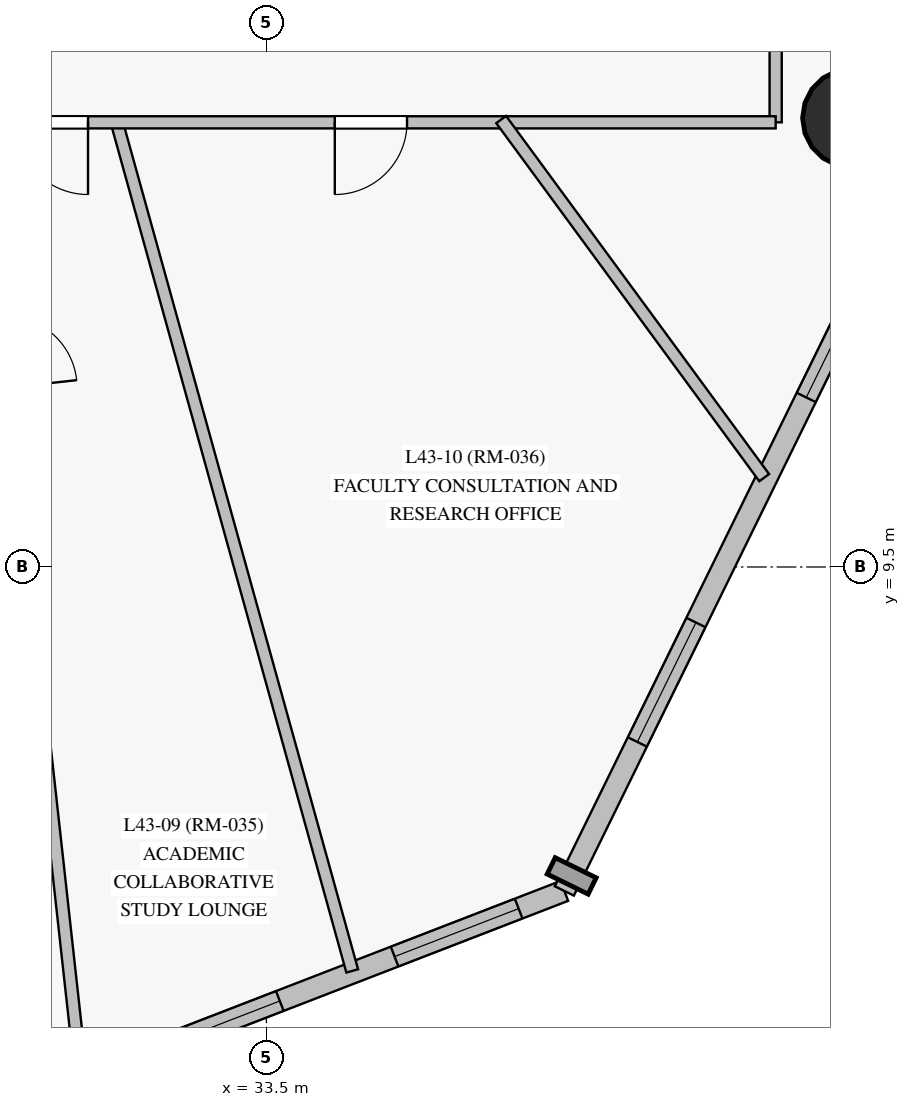
"""IFC4 building model, lengths in metres.
Left out: names, types, materials, properties, quantities, classifications, styles, units other than length and angle.
Written with IfcOpenShell. Run it as: python <this file> out.ifc"""

import sys

from ifc_helpers import new_model, si_unit, direction, frame, frame_2d, origin, origin_with_axes, origin_2d, place, context, subcontext, project, spatial, rectangle, circle, extrude, source, transform, mapped, element, fill, save


model = new_model("IFC4")
c1 = context("Model", 3, precision=1e-05, world=origin(), true_north=direction((0.0, 1.0)))
c2 = subcontext(c1, "Body", "Model", "MODEL_VIEW")
j1 = project(units=[si_unit("LENGTHUNIT", "METRE"), si_unit("PLANEANGLEUNIT", "RADIAN")], contexts=[c1])
p1 = place(None, origin())
s1 = spatial("IfcSite", under=j1, at=p1, CompositionType="ELEMENT")
p2 = place(p1, origin())
s2 = spatial("IfcBuilding", under=s1, at=p2, CompositionType="ELEMENT")
p3 = place(p2, frame((0.0, 0.0, 152.55)))
s3 = spatial("IfcBuildingStorey", under=s2, at=p3, CompositionType="ELEMENT", Elevation=152.55)
m1 = source(origin_with_axes(), c2, "Body", "SweptSolid", [
    extrude(circle(Radius=0.65, at=origin_2d()), origin(), (0.0, 0.0, 1.0), 4.0),
])
p4 = place(p3, frame((41.204, 15.406, 0.0), z_axis=(0.0, 0.0, 1.0), x_axis=(1.0, 0.0, 0.0)))
e1 = element("IfcColumn", 1, at=p4, inside=s3, PredefinedType="COLUMN", context=c2, shape_type="MappedRepresentation", body=[
    mapped(m1, transform((0.0, 0.0, 0.0), scale=1.0)),
])
p5 = place(p3, frame((28.661, 1.85, 0.0), z_axis=(0.0, 0.0, 1.0), x_axis=(0.93264769039, 0.360788422223, 0.0)))
e2 = element("IfcWall", 2, at=p5, inside=s3, PredefinedType="SOLIDWALL", context=c2, shape_type="SweptSolid", body=[
    extrude(rectangle(XDim=9.391, YDim=0.28, at=frame_2d((4.696, 0.0))), origin(), (0.0, 0.0, 1.0), 3.775),
])
p6 = place(p5, frame((0.552, 0.0, 0.85)))
e3 = element("IfcOpeningElement", 3, at=p6, cuts=e2, PredefinedType="OPENING", context=c2, shape_type="SweptSolid", body=[
    extrude(rectangle(XDim=1.55, YDim=1.65, at=frame_2d((0.775, 0.825))), frame((0.0, 0.15, 0.0), z_axis=(0.0, -1.0, 0.0), x_axis=(1.0, 0.0, 0.0)), (0.0, 0.0, 1.0), 0.3),
])
p7 = place(p5, frame((3.627, 0.0, 0.85)))
e4 = element("IfcOpeningElement", 4, at=p7, cuts=e2, PredefinedType="OPENING", context=c2, shape_type="SweptSolid", body=[
    extrude(rectangle(XDim=1.75, YDim=1.65, at=frame_2d((0.875, 0.825))), frame((0.0, 0.15, 0.0), z_axis=(0.0, -1.0, 0.0), x_axis=(1.0, 0.0, 0.0)), (0.0, 0.0, 1.0), 0.3),
])
p8 = place(p5, frame((6.997, 0.0, 0.85)))
e5 = element("IfcOpeningElement", 5, at=p8, cuts=e2, PredefinedType="OPENING", context=c2, shape_type="SweptSolid", body=[
    extrude(rectangle(XDim=1.75, YDim=1.65, at=frame_2d((0.875, 0.825))), frame((0.0, 0.15, 0.0), z_axis=(0.0, -1.0, 0.0), x_axis=(1.0, 0.0, 0.0)), (0.0, 0.0, 1.0), 0.3),
])
p9 = place(p3, frame((37.42, 5.238, 0.0), z_axis=(0.0, 0.0, 1.0), x_axis=(0.440185493808, 0.897906861005, 0.0)))
e6 = element("IfcWall", 6, at=p9, inside=s3, PredefinedType="SOLIDWALL", context=c2, shape_type="SweptSolid", body=[
    extrude(rectangle(XDim=13.922, YDim=0.28, at=frame_2d((6.961, 0.0))), origin(), (0.0, 0.0, 1.0), 3.775),
])
p10 = place(p9, frame((2.183, 0.0, 0.85)))
e7 = element("IfcOpeningElement", 7, at=p10, cuts=e6, PredefinedType="OPENING", context=c2, shape_type="SweptSolid", body=[
    extrude(rectangle(XDim=1.75, YDim=1.65, at=frame_2d((0.875, 0.825))), frame((0.0, 0.15, 0.0), z_axis=(0.0, -1.0, 0.0), x_axis=(1.0, 0.0, 0.0)), (0.0, 0.0, 1.0), 0.3),
])
p11 = place(p9, frame((7.23, 0.0, 0.85)))
e8 = element("IfcOpeningElement", 8, at=p11, cuts=e6, PredefinedType="OPENING", context=c2, shape_type="SweptSolid", body=[
    extrude(rectangle(XDim=1.75, YDim=1.65, at=frame_2d((0.875, 0.825))), frame((0.0, 0.15, 0.0), z_axis=(0.0, -1.0, 0.0), x_axis=(1.0, 0.0, 0.0)), (0.0, 0.0, 1.0), 0.3),
])
p12 = place(p9, frame((12.174, 0.0, 0.85)))
e9 = element("IfcOpeningElement", 9, at=p12, cuts=e6, PredefinedType="OPENING", context=c2, shape_type="SweptSolid", body=[
    extrude(rectangle(XDim=0.95, YDim=1.5, at=frame_2d((0.475, 0.75))), frame((0.0, 0.15, 0.0), z_axis=(0.0, -1.0, 0.0), x_axis=(1.0, 0.0, 0.0)), (0.0, 0.0, 1.0), 0.3),
])
p13 = place(p3, frame((40.2, 37.65, 0.0), z_axis=(0.0, 0.0, 1.0), x_axis=(0.0, -1.0, 0.0)))
e10 = element("IfcWall", 10, at=p13, inside=s3, PredefinedType="PARTITIONING", context=c2, shape_type="SweptSolid", body=[
    extrude(rectangle(XDim=22.3, YDim=0.16, at=frame_2d((11.15, 0.0))), origin(), (0.0, 0.0, 1.0), 3.325),
])
p14 = place(p13, frame((16.25, 0.0, 0.0)))
e11 = element("IfcOpeningElement", 11, at=p14, cuts=e10, PredefinedType="OPENING", context=c2, shape_type="SweptSolid", body=[
    extrude(rectangle(XDim=0.95, YDim=2.15, at=frame_2d((0.475, 1.075))), frame((0.0, 0.09, 0.0), z_axis=(0.0, -1.0, 0.0), x_axis=(1.0, 0.0, 0.0)), (0.0, 0.0, 1.0), 0.18),
])
p15 = place(p13, frame((11.115, 0.0, 0.0)))
e12 = element("IfcOpeningElement", 12, at=p15, cuts=e10, PredefinedType="OPENING", context=c2, shape_type="SweptSolid", body=[
    extrude(rectangle(XDim=0.95, YDim=2.15, at=frame_2d((0.475, 1.075))), frame((0.0, 0.09, 0.0), z_axis=(0.0, -1.0, 0.0), x_axis=(1.0, 0.0, 0.0)), (0.0, 0.0, 1.0), 0.18),
])
p16 = place(p13, frame((7.33, 0.0, 0.0)))
e13 = element("IfcOpeningElement", 13, at=p16, cuts=e10, PredefinedType="OPENING", context=c2, shape_type="SweptSolid", body=[
    extrude(rectangle(XDim=0.95, YDim=2.15, at=frame_2d((0.475, 1.075))), frame((0.0, 0.09, 0.0), z_axis=(0.0, -1.0, 0.0), x_axis=(1.0, 0.0, 0.0)), (0.0, 0.0, 1.0), 0.18),
])
p17 = place(p13, frame((5.01, 0.0, 0.0)))
e14 = element("IfcOpeningElement", 14, at=p17, cuts=e10, PredefinedType="OPENING", context=c2, shape_type="SweptSolid", body=[
    extrude(rectangle(XDim=0.95, YDim=2.15, at=frame_2d((0.475, 1.075))), frame((0.0, 0.09, 0.0), z_axis=(0.0, -1.0, 0.0), x_axis=(1.0, 0.0, 0.0)), (0.0, 0.0, 1.0), 0.18),
])
p18 = place(p3, frame((29.67, 15.38, 0.0), z_axis=(0.0, 0.0, 1.0), x_axis=(0.109978172038, -0.993934002676, 0.0)))
e15 = element("IfcWall", 15, at=p18, inside=s3, PredefinedType="PARTITIONING", context=c2, shape_type="SweptSolid", body=[
    extrude(rectangle(XDim=12.649, YDim=0.16, at=frame_2d((6.324, 0.0))), origin(), (0.0, 0.0, 1.0), 3.775),
])
p19 = place(p18, frame((2.598, 0.0, 0.0)))
e16 = element("IfcOpeningElement", 16, at=p19, cuts=e15, PredefinedType="OPENING", context=c2, shape_type="SweptSolid", body=[
    extrude(rectangle(XDim=0.95, YDim=2.15, at=frame_2d((0.475, 1.075))), frame((0.0, 0.09, 0.0), z_axis=(0.0, -1.0, 0.0), x_axis=(1.0, 0.0, 0.0)), (0.0, 0.0, 1.0), 0.18),
])
p20 = place(p3, frame((31.523, 15.379, 0.0), z_axis=(0.0, 0.0, 1.0), x_axis=(0.267345748254, -0.963600669827, 0.0)))
e17 = element("IfcWall", 17, at=p20, inside=s3, PredefinedType="PARTITIONING", context=c2, shape_type="SweptSolid", body=[
    extrude(rectangle(XDim=11.616, YDim=0.16, at=frame_2d((5.808, 0.0))), origin(), (0.0, 0.0, 1.0), 3.775),
])
p21 = place(p3, frame((40.2, 15.35, 0.0), z_axis=(0.0, 0.0, 1.0), x_axis=(-1.0, 0.0, 0.0)))
e18 = element("IfcWall", 18, at=p21, inside=s3, PredefinedType="PARTITIONING", context=c2, shape_type="SweptSolid", body=[
    extrude(rectangle(XDim=10.65, YDim=0.16, at=frame_2d((5.325, 0.0))), origin(), (0.0, 0.0, 1.0), 2.975),
])
p22 = place(p21, frame((9.047, 0.0, 0.0)))
e19 = element("IfcOpeningElement", 19, at=p22, cuts=e18, PredefinedType="OPENING", context=c2, shape_type="SweptSolid", body=[
    extrude(rectangle(XDim=0.95, YDim=2.15, at=frame_2d((0.475, 1.075))), frame((0.0, 0.09, 0.0), z_axis=(0.0, -1.0, 0.0), x_axis=(1.0, 0.0, 0.0)), (0.0, 0.0, 1.0), 0.18),
])
p23 = place(p21, frame((4.85, 0.0, 0.0)))
e20 = element("IfcOpeningElement", 20, at=p23, cuts=e18, PredefinedType="OPENING", context=c2, shape_type="SweptSolid", body=[
    extrude(rectangle(XDim=0.95, YDim=2.15, at=frame_2d((0.475, 1.075))), frame((0.0, 0.09, 0.0), z_axis=(0.0, -1.0, 0.0), x_axis=(1.0, 0.0, 0.0)), (0.0, 0.0, 1.0), 0.18),
])
p24 = place(p3, frame((36.589, 15.386, 0.0), z_axis=(0.0, 0.0, 1.0), x_axis=(0.59197733649, -0.805954609815, 0.0)))
e21 = element("IfcWall", 21, at=p24, inside=s3, PredefinedType="PARTITIONING", context=c2, shape_type="SweptSolid", body=[
    extrude(rectangle(XDim=5.845, YDim=0.16, at=frame_2d((2.923, 0.0))), origin(), (0.0, 0.0, 1.0), 3.775),
])
m2 = source(origin_with_axes(), c2, "Body", "SweptSolid", [
    extrude(rectangle(XDim=1.75, YDim=1.65, at=frame_2d((0.875, 0.825))), frame((0.0, 0.03, 0.0), z_axis=(0.0, -1.0, 0.0), x_axis=(1.0, 0.0, 0.0)), (0.0, 0.0, 1.0), 0.06),
])
p25 = place(p7, origin())
e22 = element("IfcWindow", 22, at=p25, inside=s3, PartitioningType="SINGLE_PANEL", PredefinedType="WINDOW", context=c2, shape_type="MappedRepresentation", body=[
    mapped(m2, transform((0.0, 0.0, 0.0), scale=1.0)),
])
fill(e4, e22)
p26 = place(p8, origin())
e23 = element("IfcWindow", 23, at=p26, inside=s3, PartitioningType="SINGLE_PANEL", PredefinedType="WINDOW", context=c2, shape_type="MappedRepresentation", body=[
    mapped(m2, transform((0.0, 0.0, 0.0), scale=1.0)),
])
fill(e5, e23)
p27 = place(p10, origin())
e24 = element("IfcWindow", 24, at=p27, inside=s3, PartitioningType="SINGLE_PANEL", PredefinedType="WINDOW", context=c2, shape_type="MappedRepresentation", body=[
    mapped(m2, transform((0.0, 0.0, 0.0), scale=1.0)),
])
fill(e7, e24)
p28 = place(p11, origin())
e25 = element("IfcWindow", 25, at=p28, inside=s3, PartitioningType="SINGLE_PANEL", PredefinedType="WINDOW", context=c2, shape_type="MappedRepresentation", body=[
    mapped(m2, transform((0.0, 0.0, 0.0), scale=1.0)),
])
fill(e8, e25)
m3 = source(origin_with_axes(), c2, "Body", "SweptSolid", [
    extrude(rectangle(XDim=0.95, YDim=2.15, at=frame_2d((0.475, 1.075))), frame((0.0, 0.025, 0.0), z_axis=(0.0, -1.0, 0.0), x_axis=(1.0, 0.0, 0.0)), (0.0, 0.0, 1.0), 0.05),
])
p29 = place(p22, origin())
e26 = element("IfcDoor", 26, at=p29, inside=s3, OperationType="SINGLE_SWING_LEFT", PredefinedType="DOOR", context=c2, shape_type="MappedRepresentation", body=[
    mapped(m3, transform((0.0, 0.0, 0.0), scale=1.0)),
])
fill(e19, e26)
p30 = place(p23, origin())
e27 = element("IfcDoor", 27, at=p30, inside=s3, OperationType="SINGLE_SWING_RIGHT", PredefinedType="DOOR", context=c2, shape_type="MappedRepresentation", body=[
    mapped(m3, transform((0.0, 0.0, 0.0), scale=1.0)),
])
fill(e20, e27)
save(model, sys.argv[1])
